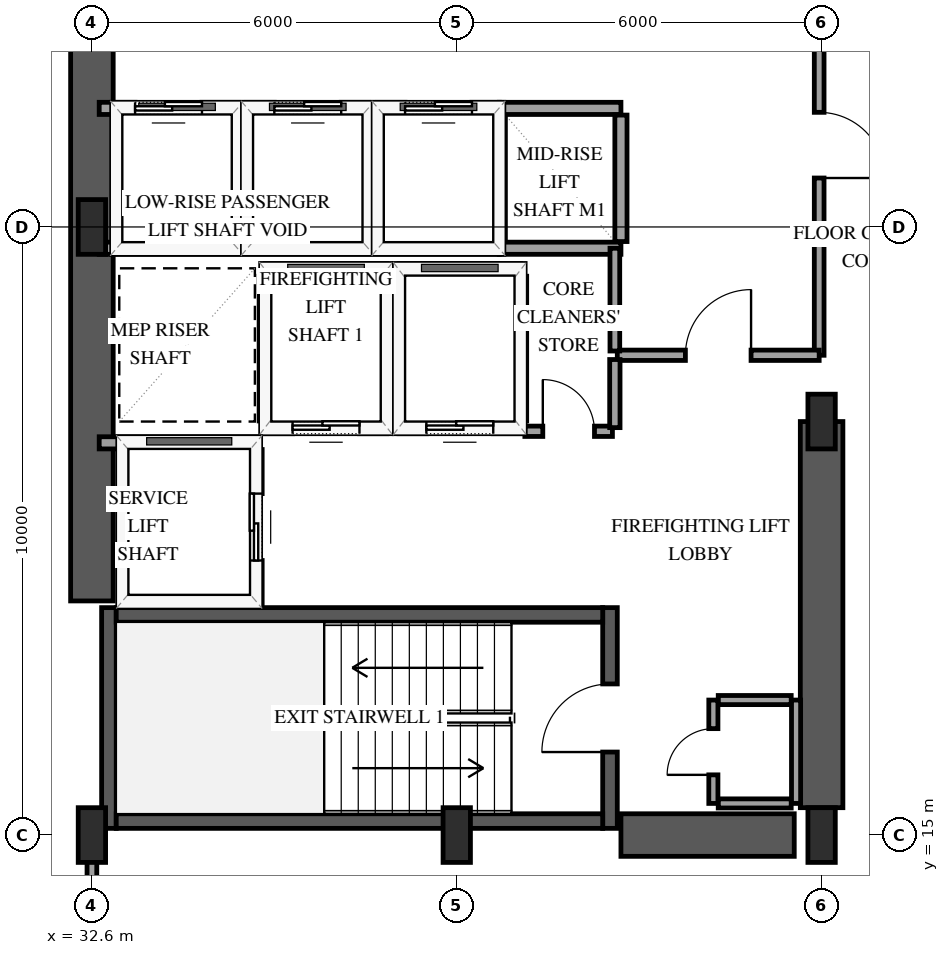
"""IFC4 building model, lengths in metres.
Left out: names, types, materials, properties, quantities, classifications, styles, units other than length and angle.
Written with IfcOpenShell. Run it as: python <this file> out.ifc"""

import sys

from ifc_helpers import new_model, si_unit, direction, frame, frame_2d, origin, origin_2d, place, context, subcontext, project, spatial, rectangle, extrude, element, fill, save


model = new_model("IFC4")
c1 = context("Model", 3, precision=1e-05, world=origin(), true_north=direction((0.0, 1.0)))
c2 = subcontext(c1, "Body", "Model", "MODEL_VIEW")
j1 = project(units=[si_unit("LENGTHUNIT", "METRE"), si_unit("PLANEANGLEUNIT", "RADIAN")], contexts=[c1])
p1 = place(None, origin())
s1 = spatial("IfcSite", under=j1, at=p1, CompositionType="ELEMENT")
p2 = place(p1, origin())
s2 = spatial("IfcBuilding", under=s1, at=p2, CompositionType="ELEMENT")
p3 = place(p2, frame((0.0, 0.0, 78.6)))
s3 = spatial("IfcBuildingStorey", under=s2, at=p3, CompositionType="ELEMENT", Elevation=78.6)
p4 = place(p3, frame((32.88, 15.11, 0.0), z_axis=(0.0, 0.0, 1.0), x_axis=(0.0, 1.0, 0.0)))
e1 = element("IfcWall", 1, at=p4, inside=s3, PredefinedType="SHEAR", context=c2, shape_type="SweptSolid", body=[
    extrude(rectangle(XDim=3.63, YDim=0.24, at=frame_2d((1.815, 0.0))), origin(), (0.0, 0.0, 1.0), 4.0),
])
p5 = place(p3, frame((41.12, 15.11, 0.0), z_axis=(0.0, 0.0, 1.0), x_axis=(0.0, 1.0, 0.0)))
e2 = element("IfcWall", 2, at=p5, inside=s3, PredefinedType="SHEAR", context=c2, shape_type="SweptSolid", body=[
    extrude(rectangle(XDim=3.63, YDim=0.24, at=frame_2d((1.815, 0.0))), origin(), (0.0, 0.0, 1.0), 4.0),
])
p6 = place(p5, frame((1.255, 0.0, 0.0)))
e3 = element("IfcOpeningElement", 3, at=p6, cuts=e2, PredefinedType="OPENING", context=c2, shape_type="SweptSolid", body=[
    extrude(rectangle(XDim=1.12, YDim=2.15, at=frame_2d((0.56, 1.075))), frame((0.0, 0.13, 0.0), z_axis=(0.0, -1.0, 0.0), x_axis=(1.0, 0.0, 0.0)), (0.0, 0.0, 1.0), 0.26),
])
for number, where, z_axis, x_axis in (
    (4, (33.0, 15.23, 0.0), (0.0, 0.0, 1.0), (1.0, 0.0, 0.0)),
    (5, (33.0, 18.62, 0.0), (0.0, 0.0, 1.0), (1.0, 0.0, 0.0)),
):
    element("IfcWall", number, at=place(p3, frame(where, z_axis=z_axis, x_axis=x_axis)), inside=s3, PredefinedType="SHEAR", context=c2, shape_type="SweptSolid", body=[
        extrude(rectangle(XDim=8.0, YDim=0.24, at=frame_2d((4.0, 0.0))), origin(), (0.0, 0.0, 1.0), 4.0),
    ])
p7 = place(p3, frame((32.6, 18.85, 0.0), z_axis=(0.0, 0.0, 1.0), x_axis=(0.0, 1.0, 0.0)))
e6 = element("IfcWall", 6, at=p7, inside=s3, PredefinedType="SHEAR", context=c2, shape_type="SweptSolid", body=[
    extrude(rectangle(XDim=12.3, YDim=0.7, at=frame_2d((6.15, 0.0))), origin(), (0.0, 0.0, 1.0), 4.0),
])
p8 = place(p3, frame((41.3, 15.0, 0.0), z_axis=(0.0, 0.0, 1.0), x_axis=(1.0, 0.0, 0.0)))
e7 = element("IfcWall", 7, at=p8, inside=s3, PredefinedType="SHEAR", context=c2, shape_type="SweptSolid", body=[
    extrude(rectangle(XDim=2.85, YDim=0.7, at=frame_2d((1.425, 0.0))), origin(), (0.0, 0.0, 1.0), 4.0),
])
p9 = place(p3, frame((44.6, 15.45, 0.0), z_axis=(0.0, 0.0, 1.0), x_axis=(0.0, 1.0, 0.0)))
e8 = element("IfcWall", 8, at=p9, inside=s3, PredefinedType="SHEAR", context=c2, shape_type="SweptSolid", body=[
    extrude(rectangle(XDim=6.35, YDim=0.7, at=frame_2d((3.175, 0.0))), origin(), (0.0, 0.0, 1.0), 4.0),
])
for number, where, z_axis, x_axis in (
    (9, (32.6, 15.0, 0.0), (0.0, 0.0, 1.0), (1.0, 0.0, 0.0)),
    (10, (32.6, 25.0, 0.0), (0.0, 0.0, 1.0), (1.0, 0.0, 0.0)),
    (11, (38.6, 15.0, 0.0), (0.0, 0.0, 1.0), (1.0, 0.0, 0.0)),
    (12, (44.6, 15.0, 0.0), (0.0, 0.0, 1.0), (1.0, 0.0, 0.0)),
    (13, (44.6, 21.8, 0.0), (0.0, 0.0, 1.0), (1.0, 0.0, 0.0)),
):
    element("IfcColumn", number, at=place(p3, frame(where, z_axis=z_axis, x_axis=x_axis)), inside=s3, PredefinedType="PILASTER", context=c2, shape_type="SweptSolid", body=[
        extrude(rectangle(XDim=0.45, YDim=0.9, at=origin_2d()), origin(), (0.0, 0.0, 1.0), 4.0),
    ])
p10 = place(p3, frame((35.45, 21.7, 0.0), z_axis=(0.0, 0.0, 1.0), x_axis=(1.0, 0.0, 0.0)))
e14 = element("IfcWall", 14, at=p10, inside=s3, PredefinedType="SOLIDWALL", context=c2, shape_type="SweptSolid", body=[
    extrude(rectangle(XDim=2.0, YDim=0.2, at=frame_2d((1.0, 0.0))), origin(), (0.0, 0.0, 1.0), 3.66),
])
p11 = place(p10, frame((0.45, 0.0, 0.0)))
e15 = element("IfcOpeningElement", 15, at=p11, cuts=e14, PredefinedType="OPENING", context=c2, shape_type="SweptSolid", body=[
    extrude(rectangle(XDim=1.1, YDim=2.15, at=frame_2d((0.55, 1.075))), frame((0.0, 0.11, 0.0), z_axis=(0.0, -1.0, 0.0), x_axis=(1.0, 0.0, 0.0)), (0.0, 0.0, 1.0), 0.22),
])
p12 = place(p3, frame((35.45, 24.3, 0.0), z_axis=(0.0, 0.0, 1.0), x_axis=(1.0, 0.0, 0.0)))
e16 = element("IfcWall", 16, at=p12, inside=s3, PredefinedType="SOLIDWALL", context=c2, shape_type="SweptSolid", body=[
    extrude(rectangle(XDim=2.0, YDim=0.2, at=frame_2d((1.0, 0.0))), origin(), (0.0, 0.0, 1.0), 3.66),
])
for number, where, z_axis, x_axis in (
    (17, (35.45, 21.81, 0.0), (0.0, 0.0, 1.0), (0.0, 1.0, 0.0)),
    (18, (37.45, 21.81, 0.0), (0.0, 0.0, 1.0), (0.0, 1.0, 0.0)),
):
    element("IfcWall", number, at=place(p3, frame(where, z_axis=z_axis, x_axis=x_axis)), inside=s3, PredefinedType="SOLIDWALL", context=c2, shape_type="SweptSolid", body=[
        extrude(rectangle(XDim=2.38, YDim=0.2, at=frame_2d((1.19, 0.0))), origin(), (0.0, 0.0, 1.0), 3.66),
    ])
p13 = place(p3, frame((37.65, 21.7, 0.0), z_axis=(0.0, 0.0, 1.0), x_axis=(1.0, 0.0, 0.0)))
e19 = element("IfcWall", 19, at=p13, inside=s3, PredefinedType="SOLIDWALL", context=c2, shape_type="SweptSolid", body=[
    extrude(rectangle(XDim=2.0, YDim=0.2, at=frame_2d((1.0, 0.0))), origin(), (0.0, 0.0, 1.0), 3.66),
])
p14 = place(p13, frame((0.45, 0.0, 0.0)))
e20 = element("IfcOpeningElement", 20, at=p14, cuts=e19, PredefinedType="OPENING", context=c2, shape_type="SweptSolid", body=[
    extrude(rectangle(XDim=1.1, YDim=2.15, at=frame_2d((0.55, 1.075))), frame((0.0, 0.11, 0.0), z_axis=(0.0, -1.0, 0.0), x_axis=(1.0, 0.0, 0.0)), (0.0, 0.0, 1.0), 0.22),
])
p15 = place(p3, frame((37.65, 24.3, 0.0), z_axis=(0.0, 0.0, 1.0), x_axis=(1.0, 0.0, 0.0)))
e21 = element("IfcWall", 21, at=p15, inside=s3, PredefinedType="SOLIDWALL", context=c2, shape_type="SweptSolid", body=[
    extrude(rectangle(XDim=2.0, YDim=0.2, at=frame_2d((1.0, 0.0))), origin(), (0.0, 0.0, 1.0), 3.66),
])
p16 = place(p3, frame((39.65, 21.81, 0.0), z_axis=(0.0, 0.0, 1.0), x_axis=(0.0, 1.0, 0.0)))
e22 = element("IfcWall", 22, at=p16, inside=s3, PredefinedType="SOLIDWALL", context=c2, shape_type="SweptSolid", body=[
    extrude(rectangle(XDim=2.38, YDim=0.2, at=frame_2d((1.19, 0.0))), origin(), (0.0, 0.0, 1.0), 3.66),
])
p17 = place(p3, frame((32.72, 21.45, 0.0), z_axis=(0.0, 0.0, 1.0), x_axis=(1.0, 0.0, 0.0)))
e23 = element("IfcWall", 23, at=p17, inside=s3, PredefinedType="SOLIDWALL", context=c2, shape_type="SweptSolid", body=[
    extrude(rectangle(XDim=2.58, YDim=0.2, at=frame_2d((1.29, 0.0))), origin(), (0.0, 0.0, 1.0), 3.66),
])
p18 = place(p3, frame((35.3, 18.79, 0.0), z_axis=(0.0, 0.0, 1.0), x_axis=(0.0, 1.0, 0.0)))
e24 = element("IfcWall", 24, at=p18, inside=s3, PredefinedType="SOLIDWALL", context=c2, shape_type="SweptSolid", body=[
    extrude(rectangle(XDim=2.55, YDim=0.2, at=frame_2d((1.275, 0.0))), origin(), (0.0, 0.0, 1.0), 3.66),
])
p19 = place(p18, frame((0.725, 0.0, 0.0)))
e25 = element("IfcOpeningElement", 25, at=p19, cuts=e24, PredefinedType="OPENING", context=c2, shape_type="SweptSolid", body=[
    extrude(rectangle(XDim=1.1, YDim=2.15, at=frame_2d((0.55, 1.075))), frame((0.0, 0.11, 0.0), z_axis=(0.0, -1.0, 0.0), x_axis=(1.0, 0.0, 0.0)), (0.0, 0.0, 1.0), 0.22),
])
p20 = place(p3, frame((32.72, 24.65, 0.0), z_axis=(0.0, 0.0, 1.0), x_axis=(1.0, 0.0, 0.0)))
e26 = element("IfcWall", 26, at=p20, inside=s3, PredefinedType="SOLIDWALL", context=c2, shape_type="SweptSolid", body=[
    extrude(rectangle(XDim=2.28, YDim=0.2, at=frame_2d((1.14, 0.0))), origin(), (0.0, 0.0, 1.0), 3.66),
])
p21 = place(p3, frame((32.72, 26.95, 0.0), z_axis=(0.0, 0.0, 1.0), x_axis=(1.0, 0.0, 0.0)))
e27 = element("IfcWall", 27, at=p21, inside=s3, PredefinedType="SOLIDWALL", context=c2, shape_type="SweptSolid", body=[
    extrude(rectangle(XDim=2.28, YDim=0.2, at=frame_2d((1.14, 0.0))), origin(), (0.0, 0.0, 1.0), 3.66),
])
p22 = place(p21, frame((0.59, 0.0, 0.0)))
e28 = element("IfcOpeningElement", 28, at=p22, cuts=e27, PredefinedType="OPENING", context=c2, shape_type="SweptSolid", body=[
    extrude(rectangle(XDim=1.1, YDim=2.15, at=frame_2d((0.55, 1.075))), frame((0.0, 0.11, 0.0), z_axis=(0.0, -1.0, 0.0), x_axis=(1.0, 0.0, 0.0)), (0.0, 0.0, 1.0), 0.22),
])
p23 = place(p3, frame((35.0, 24.76, 0.0), z_axis=(0.0, 0.0, 1.0), x_axis=(0.0, 1.0, 0.0)))
e29 = element("IfcWall", 29, at=p23, inside=s3, PredefinedType="SOLIDWALL", context=c2, shape_type="SweptSolid", body=[
    extrude(rectangle(XDim=2.08, YDim=0.2, at=frame_2d((1.04, 0.0))), origin(), (0.0, 0.0, 1.0), 3.66),
])
p24 = place(p3, frame((35.15, 24.65, 0.0), z_axis=(0.0, 0.0, 1.0), x_axis=(1.0, 0.0, 0.0)))
e30 = element("IfcWall", 30, at=p24, inside=s3, PredefinedType="SOLIDWALL", context=c2, shape_type="SweptSolid", body=[
    extrude(rectangle(XDim=2.0, YDim=0.2, at=frame_2d((1.0, 0.0))), origin(), (0.0, 0.0, 1.0), 3.66),
])
p25 = place(p3, frame((35.15, 26.95, 0.0), z_axis=(0.0, 0.0, 1.0), x_axis=(1.0, 0.0, 0.0)))
e31 = element("IfcWall", 31, at=p25, inside=s3, PredefinedType="SOLIDWALL", context=c2, shape_type="SweptSolid", body=[
    extrude(rectangle(XDim=2.0, YDim=0.2, at=frame_2d((1.0, 0.0))), origin(), (0.0, 0.0, 1.0), 3.66),
])
p26 = place(p25, frame((0.45, 0.0, 0.0)))
e32 = element("IfcOpeningElement", 32, at=p26, cuts=e31, PredefinedType="OPENING", context=c2, shape_type="SweptSolid", body=[
    extrude(rectangle(XDim=1.1, YDim=2.15, at=frame_2d((0.55, 1.075))), frame((0.0, 0.11, 0.0), z_axis=(0.0, -1.0, 0.0), x_axis=(1.0, 0.0, 0.0)), (0.0, 0.0, 1.0), 0.22),
])
p27 = place(p3, frame((37.15, 24.76, 0.0), z_axis=(0.0, 0.0, 1.0), x_axis=(0.0, 1.0, 0.0)))
e33 = element("IfcWall", 33, at=p27, inside=s3, PredefinedType="SOLIDWALL", context=c2, shape_type="SweptSolid", body=[
    extrude(rectangle(XDim=2.08, YDim=0.2, at=frame_2d((1.04, 0.0))), origin(), (0.0, 0.0, 1.0), 3.66),
])
p28 = place(p3, frame((37.3, 24.65, 0.0), z_axis=(0.0, 0.0, 1.0), x_axis=(1.0, 0.0, 0.0)))
e34 = element("IfcWall", 34, at=p28, inside=s3, PredefinedType="SOLIDWALL", context=c2, shape_type="SweptSolid", body=[
    extrude(rectangle(XDim=2.0, YDim=0.2, at=frame_2d((1.0, 0.0))), origin(), (0.0, 0.0, 1.0), 3.66),
])
p29 = place(p3, frame((37.3, 26.95, 0.0), z_axis=(0.0, 0.0, 1.0), x_axis=(1.0, 0.0, 0.0)))
e35 = element("IfcWall", 35, at=p29, inside=s3, PredefinedType="SOLIDWALL", context=c2, shape_type="SweptSolid", body=[
    extrude(rectangle(XDim=2.0, YDim=0.2, at=frame_2d((1.0, 0.0))), origin(), (0.0, 0.0, 1.0), 3.66),
])
p30 = place(p29, frame((0.45, 0.0, 0.0)))
e36 = element("IfcOpeningElement", 36, at=p30, cuts=e35, PredefinedType="OPENING", context=c2, shape_type="SweptSolid", body=[
    extrude(rectangle(XDim=1.1, YDim=2.15, at=frame_2d((0.55, 1.075))), frame((0.0, 0.11, 0.0), z_axis=(0.0, -1.0, 0.0), x_axis=(1.0, 0.0, 0.0)), (0.0, 0.0, 1.0), 0.22),
])
p31 = place(p3, frame((39.3, 24.76, 0.0), z_axis=(0.0, 0.0, 1.0), x_axis=(0.0, 1.0, 0.0)))
e37 = element("IfcWall", 37, at=p31, inside=s3, PredefinedType="SOLIDWALL", context=c2, shape_type="SweptSolid", body=[
    extrude(rectangle(XDim=2.08, YDim=0.2, at=frame_2d((1.04, 0.0))), origin(), (0.0, 0.0, 1.0), 3.66),
])
for number, where, z_axis, x_axis in (
    (38, (39.3, 24.65, 0.0), (0.0, 0.0, 1.0), (1.0, 0.0, 0.0)),
    (39, (39.3, 26.95, 0.0), (0.0, 0.0, 1.0), (1.0, 0.0, 0.0)),
):
    element("IfcWall", number, at=place(p3, frame(where, z_axis=z_axis, x_axis=x_axis)), inside=s3, PredefinedType="SOLIDWALL", context=c2, shape_type="SweptSolid", body=[
        extrude(rectangle(XDim=2.0, YDim=0.2, at=frame_2d((1.0, 0.0))), origin(), (0.0, 0.0, 1.0), 3.66),
    ])
p32 = place(p3, frame((41.3, 24.76, 0.0), z_axis=(0.0, 0.0, 1.0), x_axis=(0.0, 1.0, 0.0)))
e40 = element("IfcWall", 40, at=p32, inside=s3, PredefinedType="SOLIDWALL", context=c2, shape_type="SweptSolid", body=[
    extrude(rectangle(XDim=2.08, YDim=0.2, at=frame_2d((1.04, 0.0))), origin(), (0.0, 0.0, 1.0), 3.66),
])
for number, where, z_axis, x_axis in (
    (41, (42.9, 15.52, 0.0), (0.0, 0.0, 1.0), (1.0, 0.0, 0.0)),
    (42, (42.9, 17.22, 0.0), (0.0, 0.0, 1.0), (1.0, 0.0, 0.0)),
):
    element("IfcWall", number, at=place(p3, frame(where, z_axis=z_axis, x_axis=x_axis)), inside=s3, PredefinedType="PARTITIONING", context=c2, shape_type="SweptSolid", body=[
        extrude(rectangle(XDim=1.2, YDim=0.15, at=frame_2d((0.6, 0.0))), origin(), (0.0, 0.0, 1.0), 3.66),
    ])
p33 = place(p3, frame((44.18, 15.52, 0.0), z_axis=(0.0, 0.0, 1.0), x_axis=(0.0, 1.0, 0.0)))
e43 = element("IfcWall", 43, at=p33, inside=s3, PredefinedType="PARTITIONING", context=c2, shape_type="SweptSolid", body=[
    extrude(rectangle(XDim=1.7, YDim=0.15, at=frame_2d((0.85, 0.0))), origin(), (0.0, 0.0, 1.0), 3.66),
])
p34 = place(p3, frame((42.82, 15.52, 0.0), z_axis=(0.0, 0.0, 1.0), x_axis=(0.0, 1.0, 0.0)))
e44 = element("IfcWall", 44, at=p34, inside=s3, PredefinedType="PARTITIONING", context=c2, shape_type="SweptSolid", body=[
    extrude(rectangle(XDim=1.7, YDim=0.15, at=frame_2d((0.85, 0.0))), origin(), (0.0, 0.0, 1.0), 3.66),
])
p35 = place(p34, frame((0.47, 0.0, 0.0)))
e45 = element("IfcOpeningElement", 45, at=p35, cuts=e44, PredefinedType="OPENING", context=c2, shape_type="SweptSolid", body=[
    extrude(rectangle(XDim=0.76, YDim=2.0, at=frame_2d((0.38, 1.0))), frame((0.0, 0.085, 0.0), z_axis=(0.0, -1.0, 0.0), x_axis=(1.0, 0.0, 0.0)), (0.0, 0.0, 1.0), 0.17),
])
p36 = place(p3, frame((44.56, 29.8, 0.0), z_axis=(0.0, 0.0, 1.0), x_axis=(0.0, -1.0, 0.0)))
e46 = element("IfcWall", 46, at=p36, inside=s3, PredefinedType="PARTITIONING", context=c2, shape_type="SweptSolid", body=[
    extrude(rectangle(XDim=6.91, YDim=0.16, at=frame_2d((3.455, 0.0))), origin(), (0.0, 0.0, 1.0), 2.7),
])
p37 = place(p36, frame((2.915, 0.0, 0.0)))
e47 = element("IfcOpeningElement", 47, at=p37, cuts=e46, PredefinedType="OPENING", context=c2, shape_type="SweptSolid", body=[
    extrude(rectangle(XDim=1.08, YDim=2.15, at=frame_2d((0.54, 1.075))), frame((0.0, 0.09, 0.0), z_axis=(0.0, -1.0, 0.0), x_axis=(1.0, 0.0, 0.0)), (0.0, 0.0, 1.0), 0.18),
])
p38 = place(p3, frame((41.24, 22.89, 0.0), z_axis=(0.0, 0.0, 1.0), x_axis=(1.0, 0.0, 0.0)))
e48 = element("IfcWall", 48, at=p38, inside=s3, PredefinedType="PARTITIONING", context=c2, shape_type="SweptSolid", body=[
    extrude(rectangle(XDim=3.32, YDim=0.17, at=frame_2d((1.66, 0.0))), origin(), (0.0, 0.0, 1.0), 3.66),
])
p39 = place(p38, frame((1.12, 0.0, 0.0)))
e49 = element("IfcOpeningElement", 49, at=p39, cuts=e48, PredefinedType="OPENING", context=c2, shape_type="SweptSolid", body=[
    extrude(rectangle(XDim=1.08, YDim=2.15, at=frame_2d((0.54, 1.075))), frame((0.0, 0.095, 0.0), z_axis=(0.0, -1.0, 0.0), x_axis=(1.0, 0.0, 0.0)), (0.0, 0.0, 1.0), 0.19),
])
p40 = place(p3, frame((32.6, 13.02, 0.0), z_axis=(0.0, 0.0, 1.0), x_axis=(0.0, 1.0, 0.0)))
e50 = element("IfcWall", 50, at=p40, inside=s3, PredefinedType="PARTITIONING", context=c2, shape_type="SweptSolid", body=[
    extrude(rectangle(XDim=1.91, YDim=0.16, at=frame_2d((0.955, 0.0))), origin(), (0.0, 0.0, 1.0), 3.66),
])
p41 = place(p3, frame((41.2, 22.96, 0.0), z_axis=(0.0, 0.0, 1.0), x_axis=(0.0, 1.0, 0.0)))
e51 = element("IfcWall", 51, at=p41, inside=s3, PredefinedType="PARTITIONING", context=c2, shape_type="SweptSolid", body=[
    extrude(rectangle(XDim=1.69, YDim=0.16, at=frame_2d((0.845, 0.0))), origin(), (0.0, 0.0, 1.0), 3.66),
])
p42 = place(p3, frame((39.72, 21.64, 0.0), z_axis=(0.0, 0.0, 1.0), x_axis=(1.0, 0.0, 0.0)))
e52 = element("IfcWall", 52, at=p42, inside=s3, PredefinedType="PARTITIONING", context=c2, shape_type="SweptSolid", body=[
    extrude(rectangle(XDim=1.44, YDim=0.17, at=frame_2d((0.72, 0.0))), origin(), (0.0, 0.0, 1.0), 3.66),
])
p43 = place(p42, frame((0.295, 0.0, 0.0)))
e53 = element("IfcOpeningElement", 53, at=p43, cuts=e52, PredefinedType="OPENING", context=c2, shape_type="SweptSolid", body=[
    extrude(rectangle(XDim=0.85, YDim=2.1, at=frame_2d((0.425, 1.05))), frame((0.0, 0.095, 0.0), z_axis=(0.0, -1.0, 0.0), x_axis=(1.0, 0.0, 0.0)), (0.0, 0.0, 1.0), 0.19),
])
p44 = place(p3, frame((41.2, 21.7, 0.0), z_axis=(0.0, 0.0, 1.0), x_axis=(0.0, 1.0, 0.0)))
e54 = element("IfcWall", 54, at=p44, inside=s3, PredefinedType="PARTITIONING", context=c2, shape_type="SweptSolid", body=[
    extrude(rectangle(XDim=1.12, YDim=0.17, at=frame_2d((0.56, 0.0))), origin(), (0.0, 0.0, 1.0), 3.66),
])
p45 = place(p11, origin())
e55 = element("IfcDoor", 55, at=p45, inside=s3, OperationType="SLIDING_TO_LEFT", PredefinedType="DOOR", context=c2, shape_type="SweptSolid", body=[
    extrude(rectangle(XDim=1.1, YDim=2.15, at=frame_2d((0.55, 1.075))), frame((0.0, 0.025, 0.0), z_axis=(0.0, -1.0, 0.0), x_axis=(1.0, 0.0, 0.0)), (0.0, 0.0, 1.0), 0.05),
])
fill(e15, e55)
p46 = place(p14, origin())
e56 = element("IfcDoor", 56, at=p46, inside=s3, OperationType="SLIDING_TO_LEFT", PredefinedType="DOOR", context=c2, shape_type="SweptSolid", body=[
    extrude(rectangle(XDim=1.1, YDim=2.15, at=frame_2d((0.55, 1.075))), frame((0.0, 0.025, 0.0), z_axis=(0.0, -1.0, 0.0), x_axis=(1.0, 0.0, 0.0)), (0.0, 0.0, 1.0), 0.05),
])
fill(e20, e56)
p47 = place(p19, origin())
e57 = element("IfcDoor", 57, at=p47, inside=s3, OperationType="SLIDING_TO_LEFT", PredefinedType="DOOR", context=c2, shape_type="SweptSolid", body=[
    extrude(rectangle(XDim=1.1, YDim=2.15, at=frame_2d((0.55, 1.075))), frame((0.0, 0.025, 0.0), z_axis=(0.0, -1.0, 0.0), x_axis=(1.0, 0.0, 0.0)), (0.0, 0.0, 1.0), 0.05),
])
fill(e25, e57)
p48 = place(p22, origin())
e58 = element("IfcDoor", 58, at=p48, inside=s3, OperationType="SLIDING_TO_LEFT", PredefinedType="DOOR", context=c2, shape_type="SweptSolid", body=[
    extrude(rectangle(XDim=1.1, YDim=2.15, at=frame_2d((0.55, 1.075))), frame((0.0, 0.025, 0.0), z_axis=(0.0, -1.0, 0.0), x_axis=(1.0, 0.0, 0.0)), (0.0, 0.0, 1.0), 0.05),
])
fill(e28, e58)
p49 = place(p26, origin())
e59 = element("IfcDoor", 59, at=p49, inside=s3, OperationType="SLIDING_TO_LEFT", PredefinedType="DOOR", context=c2, shape_type="SweptSolid", body=[
    extrude(rectangle(XDim=1.1, YDim=2.15, at=frame_2d((0.55, 1.075))), frame((0.0, 0.025, 0.0), z_axis=(0.0, -1.0, 0.0), x_axis=(1.0, 0.0, 0.0)), (0.0, 0.0, 1.0), 0.05),
])
fill(e32, e59)
p50 = place(p30, origin())
e60 = element("IfcDoor", 60, at=p50, inside=s3, OperationType="SLIDING_TO_LEFT", PredefinedType="DOOR", context=c2, shape_type="SweptSolid", body=[
    extrude(rectangle(XDim=1.1, YDim=2.15, at=frame_2d((0.55, 1.075))), frame((0.0, 0.025, 0.0), z_axis=(0.0, -1.0, 0.0), x_axis=(1.0, 0.0, 0.0)), (0.0, 0.0, 1.0), 0.05),
])
fill(e36, e60)
p51 = place(p6, origin())
e61 = element("IfcDoor", 61, at=p51, inside=s3, OperationType="SINGLE_SWING_LEFT", PredefinedType="DOOR", context=c2, shape_type="SweptSolid", body=[
    extrude(rectangle(XDim=1.12, YDim=2.15, at=frame_2d((0.56, 1.075))), frame((0.0, 0.025, 0.0), z_axis=(0.0, -1.0, 0.0), x_axis=(1.0, 0.0, 0.0)), (0.0, 0.0, 1.0), 0.05),
])
fill(e3, e61)
p52 = place(p35, origin())
e62 = element("IfcDoor", 62, at=p52, inside=s3, OperationType="SINGLE_SWING_LEFT", PredefinedType="TRAPDOOR", context=c2, shape_type="SweptSolid", body=[
    extrude(rectangle(XDim=0.76, YDim=2.0, at=frame_2d((0.38, 1.0))), frame((0.0, 0.025, 0.0), z_axis=(0.0, -1.0, 0.0), x_axis=(1.0, 0.0, 0.0)), (0.0, 0.0, 1.0), 0.05),
])
fill(e45, e62)
p53 = place(p37, origin())
e63 = element("IfcDoor", 63, at=p53, inside=s3, OperationType="SINGLE_SWING_RIGHT", PredefinedType="DOOR", context=c2, shape_type="SweptSolid", body=[
    extrude(rectangle(XDim=1.08, YDim=2.15, at=frame_2d((0.54, 1.075))), frame((0.0, 0.025, 0.0), z_axis=(0.0, -1.0, 0.0), x_axis=(1.0, 0.0, 0.0)), (0.0, 0.0, 1.0), 0.05),
])
fill(e47, e63)
p54 = place(p39, origin())
e64 = element("IfcDoor", 64, at=p54, inside=s3, OperationType="SINGLE_SWING_RIGHT", PredefinedType="DOOR", context=c2, shape_type="SweptSolid", body=[
    extrude(rectangle(XDim=1.08, YDim=2.15, at=frame_2d((0.54, 1.075))), frame((0.0, 0.025, 0.0), z_axis=(0.0, -1.0, 0.0), x_axis=(1.0, 0.0, 0.0)), (0.0, 0.0, 1.0), 0.05),
])
fill(e49, e64)
p55 = place(p43, origin())
e65 = element("IfcDoor", 65, at=p55, inside=s3, OperationType="SINGLE_SWING_LEFT", PredefinedType="DOOR", context=c2, shape_type="SweptSolid", body=[
    extrude(rectangle(XDim=0.85, YDim=2.1, at=frame_2d((0.425, 1.05))), frame((0.0, 0.025, 0.0), z_axis=(0.0, -1.0, 0.0), x_axis=(1.0, 0.0, 0.0)), (0.0, 0.0, 1.0), 0.05),
])
fill(e53, e65)
save(model, sys.argv[1])
